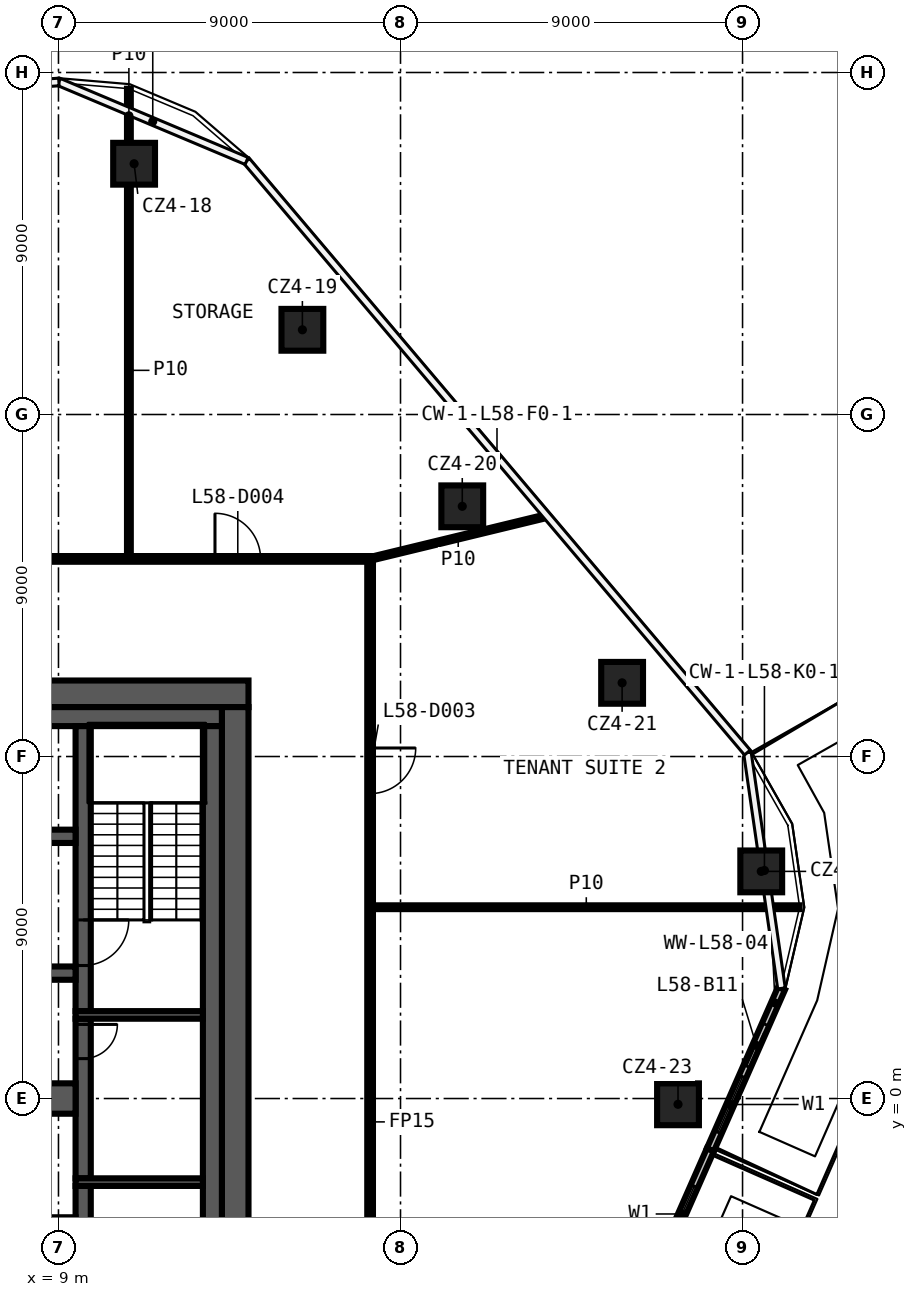
"""IFC4 building model, lengths in metres.
Left out: names, types, materials, properties, quantities, classifications, styles, units other than length and angle.
Written with IfcOpenShell. Run it as: python <this file> out.ifc"""

import sys

from ifc_helpers import new_model, si_unit, direction, frame, frame_2d, origin, origin_2d, place, context, subcontext, project, spatial, rectangle, extrude, element, fill, save


model = new_model("IFC4")
c1 = context("Model", 3, precision=1e-05, world=origin(), true_north=direction((0.0, 1.0)))
c2 = subcontext(c1, "Body", "Model", "MODEL_VIEW")
j1 = project(units=[si_unit("LENGTHUNIT", "METRE"), si_unit("PLANEANGLEUNIT", "RADIAN")], contexts=[c1])
p1 = place(None, origin())
s1 = spatial("IfcSite", under=j1, at=p1, CompositionType="ELEMENT")
p2 = place(p1, origin())
s2 = spatial("IfcBuilding", under=s1, at=p2, CompositionType="ELEMENT")
p3 = place(p2, frame((0.0, 0.0, 274.8)))
s3 = spatial("IfcBuildingStorey", under=s2, at=p3, CompositionType="ELEMENT", Elevation=274.8)
for number, where, z_axis, x_axis in (
    (1, (10.99, 24.599, 0.0), (0.0, 0.0, 1.0), (1.0, 0.0, 0.0)),
    (2, (15.418, 20.229, 0.0), (0.0, 0.0, 1.0), (1.0, 0.0, 0.0)),
    (3, (19.625, 15.584, 0.0), (0.0, 0.0, 1.0), (1.0, 0.0, 0.0)),
    (4, (23.831, 10.939, 0.0), (0.0, 0.0, 1.0), (1.0, 0.0, 0.0)),
    (5, (27.492, 5.977, 0.0), (0.0, 0.0, 1.0), (1.0, 0.0, 0.0)),
    (6, (25.302, -0.152, 0.0), (0.0, 0.0, 1.0), (1.0, 0.0, 0.0)),
):
    element("IfcColumn", number, at=place(p3, frame(where, z_axis=z_axis, x_axis=x_axis)), inside=s3, PredefinedType="COLUMN", context=c2, shape_type="SweptSolid", body=[
        extrude(rectangle(XDim=1.1, YDim=1.1, at=origin_2d()), origin(), (0.0, 0.0, 1.0), 3.82),
    ])
p4 = place(p3, frame((17.275, 5.034, 0.0), z_axis=(0.0, 0.0, 1.0), x_axis=(1.0, 0.0, 0.0)))
e7 = element("IfcWall", 7, at=p4, inside=s3, PredefinedType="PARTITIONING", context=c2, shape_type="SweptSolid", body=[
    extrude(rectangle(XDim=11.227, YDim=0.1, at=frame_2d((5.614, 0.0))), origin(), (0.0, 0.0, 1.0), 3.82),
])
p5 = place(p3, frame((-5.075, 14.2, 0.0), z_axis=(0.0, 0.0, 1.0), x_axis=(1.0, 0.0, 0.0)))
e8 = element("IfcWall", 8, at=p5, inside=s3, PredefinedType="PARTITIONING", context=c2, shape_type="SweptSolid", body=[
    extrude(rectangle(XDim=22.35, YDim=0.15, at=frame_2d((11.175, 0.0))), origin(), (0.0, 0.0, 1.0), 3.82),
])
p6 = place(p5, frame((18.193, 0.0, 0.0)))
e9 = element("IfcOpeningElement", 9, at=p6, cuts=e8, PredefinedType="OPENING", context=c2, shape_type="SweptSolid", body=[
    extrude(rectangle(XDim=1.2, YDim=2.1, at=frame_2d((0.6, 1.05))), frame((0.0, 0.085, 0.0), z_axis=(0.0, -1.0, 0.0), x_axis=(1.0, 0.0, 0.0)), (0.0, 0.0, 1.0), 0.17),
])
p7 = place(p5, frame((11.887, 0.0, 0.0)))
e10 = element("IfcOpeningElement", 10, at=p7, cuts=e8, PredefinedType="OPENING", context=c2, shape_type="SweptSolid", body=[
    extrude(rectangle(XDim=1.2, YDim=2.1, at=frame_2d((0.6, 1.05))), frame((0.0, 0.085, 0.0), z_axis=(0.0, -1.0, 0.0), x_axis=(1.0, 0.0, 0.0)), (0.0, 0.0, 1.0), 0.17),
])
p8 = place(p3, frame((17.2, 14.2, 0.0), z_axis=(0.0, 0.0, 1.0), x_axis=(0.971845844502, 0.235617602322, 0.0)))
e11 = element("IfcWall", 11, at=p8, inside=s3, PredefinedType="PARTITIONING", context=c2, shape_type="SweptSolid", body=[
    extrude(rectangle(XDim=4.771, YDim=0.1, at=frame_2d((2.385, 0.0))), origin(), (0.0, 0.0, 1.0), 3.82),
])
p9 = place(p3, frame((17.2, 14.125, 0.0), z_axis=(0.0, 0.0, 1.0), x_axis=(0.0, -1.0, 0.0)))
e12 = element("IfcWall", 12, at=p9, inside=s3, PredefinedType="PARTITIONING", context=c2, shape_type="SweptSolid", body=[
    extrude(rectangle(XDim=28.25, YDim=0.15, at=frame_2d((14.125, 0.0))), origin(), (0.0, 0.0, 1.0), 3.82),
])
p10 = place(p9, frame((23.379, 0.0, 0.0)))
e13 = element("IfcOpeningElement", 13, at=p10, cuts=e12, PredefinedType="OPENING", context=c2, shape_type="SweptSolid", body=[
    extrude(rectangle(XDim=1.2, YDim=2.1, at=frame_2d((0.6, 1.05))), frame((0.0, 0.085, 0.0), z_axis=(0.0, -1.0, 0.0), x_axis=(1.0, 0.0, 0.0)), (0.0, 0.0, 1.0), 0.17),
])
p11 = place(p9, frame((4.901, 0.0, 0.0)))
e14 = element("IfcOpeningElement", 14, at=p11, cuts=e12, PredefinedType="OPENING", context=c2, shape_type="SweptSolid", body=[
    extrude(rectangle(XDim=1.2, YDim=2.1, at=frame_2d((0.6, 1.05))), frame((0.0, 0.085, 0.0), z_axis=(0.0, -1.0, 0.0), x_axis=(1.0, 0.0, 0.0)), (0.0, 0.0, 1.0), 0.17),
])
p12 = place(p3, frame((10.853, 14.275, 0.0), z_axis=(0.0, 0.0, 1.0), x_axis=(0.0, 1.0, 0.0)))
e15 = element("IfcWall", 15, at=p12, inside=s3, PredefinedType="PARTITIONING", context=c2, shape_type="SweptSolid", body=[
    extrude(rectangle(XDim=9.774, YDim=0.1, at=frame_2d((4.887, 0.0))), origin(), (0.0, 0.0, 1.0), 3.82),
])
p13 = place(p3, frame((10.853, 25.149, 0.0), z_axis=(0.0, 0.0, 1.0), x_axis=(0.0, 1.0, 0.0)))
e16 = element("IfcWall", 16, at=p13, inside=s3, PredefinedType="PARTITIONING", context=c2, shape_type="SweptSolid", body=[
    extrude(rectangle(XDim=1.423, YDim=0.1, at=frame_2d((0.712, 0.0))), origin(), (0.0, 0.0, 1.0), 3.82),
])
p14 = place(p3, frame((20.531, -14.107, 0.0), z_axis=(0.0, 0.0, 1.0), x_axis=(0.40328714446, 0.915073482904, 0.0)))
e17 = element("IfcWall", 17, at=p14, inside=s3, PredefinedType="SOLIDWALL", context=c2, shape_type="SweptSolid", body=[
    extrude(rectangle(XDim=13.944, YDim=0.2, at=frame_2d((6.972, 0.0))), origin(), (0.0, 0.0, 1.0), 3.82),
])
p15 = place(p14, frame((0.5, 0.0, 0.6)))
e18 = element("IfcOpeningElement", 18, at=p15, cuts=e17, PredefinedType="OPENING", context=c2, shape_type="SweptSolid", body=[
    extrude(rectangle(XDim=1.6, YDim=2.4, at=frame_2d((0.8, 1.2))), frame((0.0, 0.11, 0.0), z_axis=(0.0, -1.0, 0.0), x_axis=(1.0, 0.0, 0.0)), (0.0, 0.0, 1.0), 0.22),
])
p16 = place(p14, frame((2.4, 0.0, 0.0)))
e19 = element("IfcOpeningElement", 19, at=p16, cuts=e17, PredefinedType="OPENING", context=c2, shape_type="SweptSolid", body=[
    extrude(rectangle(XDim=1.2, YDim=2.4, at=frame_2d((0.6, 1.2))), frame((0.0, 0.11, 0.0), z_axis=(0.0, -1.0, 0.0), x_axis=(1.0, 0.0, 0.0)), (0.0, 0.0, 1.0), 0.22),
])
p17 = place(p14, frame((6.648, 0.0, 0.6)))
e20 = element("IfcOpeningElement", 20, at=p17, cuts=e17, PredefinedType="OPENING", context=c2, shape_type="SweptSolid", body=[
    extrude(rectangle(XDim=1.6, YDim=2.4, at=frame_2d((0.8, 1.2))), frame((0.0, 0.11, 0.0), z_axis=(0.0, -1.0, 0.0), x_axis=(1.0, 0.0, 0.0)), (0.0, 0.0, 1.0), 0.22),
])
p18 = place(p14, frame((5.148, 0.0, 0.0)))
e21 = element("IfcOpeningElement", 21, at=p18, cuts=e17, PredefinedType="OPENING", context=c2, shape_type="SweptSolid", body=[
    extrude(rectangle(XDim=1.2, YDim=2.4, at=frame_2d((0.6, 1.2))), frame((0.0, 0.11, 0.0), z_axis=(0.0, -1.0, 0.0), x_axis=(1.0, 0.0, 0.0)), (0.0, 0.0, 1.0), 0.22),
])
p19 = place(p14, frame((11.296, 0.0, 0.6)))
e22 = element("IfcOpeningElement", 22, at=p19, cuts=e17, PredefinedType="OPENING", context=c2, shape_type="SweptSolid", body=[
    extrude(rectangle(XDim=1.6, YDim=2.4, at=frame_2d((0.8, 1.2))), frame((0.0, 0.11, 0.0), z_axis=(0.0, -1.0, 0.0), x_axis=(1.0, 0.0, 0.0)), (0.0, 0.0, 1.0), 0.22),
])
p20 = place(p14, frame((9.796, 0.0, 0.0)))
e23 = element("IfcOpeningElement", 23, at=p20, cuts=e17, PredefinedType="OPENING", context=c2, shape_type="SweptSolid", body=[
    extrude(rectangle(XDim=1.2, YDim=2.4, at=frame_2d((0.6, 1.2))), frame((0.0, 0.11, 0.0), z_axis=(0.0, -1.0, 0.0), x_axis=(1.0, 0.0, 0.0)), (0.0, 0.0, 1.0), 0.22),
])
p21 = place(p3, frame((26.154, -1.347, 0.0), z_axis=(0.0, 0.0, 1.0), x_axis=(0.403299401998, 0.915068080718, 0.0)))
e24 = element("IfcWall", 24, at=p21, inside=s3, PredefinedType="SOLIDWALL", context=c2, shape_type="SweptSolid", body=[
    extrude(rectangle(XDim=4.639, YDim=0.2, at=frame_2d((2.319, 0.0))), origin(), (0.0, 0.0, 1.0), 3.82),
])
p22 = place(p21, frame((0.5, 0.0, 0.6)))
e25 = element("IfcOpeningElement", 25, at=p22, cuts=e24, PredefinedType="OPENING", context=c2, shape_type="SweptSolid", body=[
    extrude(rectangle(XDim=1.6, YDim=2.4, at=frame_2d((0.8, 1.2))), frame((0.0, 0.11, 0.0), z_axis=(0.0, -1.0, 0.0), x_axis=(1.0, 0.0, 0.0)), (0.0, 0.0, 1.0), 0.22),
])
p23 = place(p21, frame((2.4, 0.0, 0.0)))
e26 = element("IfcOpeningElement", 26, at=p23, cuts=e24, PredefinedType="OPENING", context=c2, shape_type="SweptSolid", body=[
    extrude(rectangle(XDim=1.2, YDim=2.4, at=frame_2d((0.6, 1.2))), frame((0.0, 0.11, 0.0), z_axis=(0.0, -1.0, 0.0), x_axis=(1.0, 0.0, 0.0)), (0.0, 0.0, 1.0), 0.22),
])
p24 = place(p3, frame((-14.0, 10.65, 0.0), z_axis=(0.0, 0.0, 1.0), x_axis=(1.0, 0.0, 0.0)))
e27 = element("IfcWall", 27, at=p24, inside=s3, PredefinedType="SHEAR", context=c2, shape_type="SweptSolid", body=[
    extrude(rectangle(XDim=28.0, YDim=0.7, at=frame_2d((14.0, 0.0))), origin(), (0.0, 0.0, 1.0), 3.82),
])
p25 = place(p24, frame((15.9, 0.0, 0.0)))
e28 = element("IfcOpeningElement", 28, at=p25, cuts=e27, PredefinedType="OPENING", context=c2, shape_type="SweptSolid", body=[
    extrude(rectangle(XDim=1.6, YDim=2.1, at=frame_2d((0.8, 1.05))), frame((0.0, 0.36, 0.0), z_axis=(0.0, -1.0, 0.0), x_axis=(1.0, 0.0, 0.0)), (0.0, 0.0, 1.0), 0.72),
])
p26 = place(p3, frame((13.65, 10.3, 0.0), z_axis=(0.0, 0.0, 1.0), x_axis=(0.0, -1.0, 0.0)))
e29 = element("IfcWall", 29, at=p26, inside=s3, PredefinedType="SHEAR", context=c2, shape_type="SweptSolid", body=[
    extrude(rectangle(XDim=20.6, YDim=0.7, at=frame_2d((10.3, 0.0))), origin(), (0.0, 0.0, 1.0), 3.82),
])
p27 = place(p3, frame((3.9, 10.05, 0.0), z_axis=(0.0, 0.0, 1.0), x_axis=(1.0, 0.0, 0.0)))
e30 = element("IfcWall", 30, at=p27, inside=s3, PredefinedType="SHEAR", context=c2, shape_type="SweptSolid", body=[
    extrude(rectangle(XDim=9.4, YDim=0.5, at=frame_2d((4.7, 0.0))), origin(), (0.0, 0.0, 1.0), 3.82),
])
p28 = place(p3, frame((13.05, 9.8, 0.0), z_axis=(0.0, 0.0, 1.0), x_axis=(0.0, -1.0, 0.0)))
e31 = element("IfcWall", 31, at=p28, inside=s3, PredefinedType="SHEAR", context=c2, shape_type="SweptSolid", body=[
    extrude(rectangle(XDim=19.6, YDim=0.5, at=frame_2d((9.8, 0.0))), origin(), (0.0, 0.0, 1.0), 3.82),
])
p29 = place(p3, frame((9.65, -2.3, 0.0), z_axis=(0.0, 0.0, 1.0), x_axis=(0.0, -1.0, 0.0)))
e32 = element("IfcWall", 32, at=p29, inside=s3, PredefinedType="SHEAR", context=c2, shape_type="SweptSolid", body=[
    extrude(rectangle(XDim=7.5, YDim=0.4, at=frame_2d((3.75, 0.0))), origin(), (0.0, 0.0, 1.0), 3.82),
])
p30 = place(p29, frame((1.2, 0.0, 0.0)))
e33 = element("IfcOpeningElement", 33, at=p30, cuts=e32, PredefinedType="OPENING", context=c2, shape_type="SweptSolid", body=[
    extrude(rectangle(XDim=1.2, YDim=2.1, at=frame_2d((0.6, 1.05))), frame((0.0, 0.21, 0.0), z_axis=(0.0, -1.0, 0.0), x_axis=(1.0, 0.0, 0.0)), (0.0, 0.0, 1.0), 0.42),
])
p31 = place(p3, frame((9.65, 2.1, 0.0), z_axis=(0.0, 0.0, 1.0), x_axis=(0.0, -1.0, 0.0)))
e34 = element("IfcWall", 34, at=p31, inside=s3, PredefinedType="SHEAR", context=c2, shape_type="SweptSolid", body=[
    extrude(rectangle(XDim=4.2, YDim=0.4, at=frame_2d((2.1, 0.0))), origin(), (0.0, 0.0, 1.0), 3.82),
])
p32 = place(p31, frame((0.15, 0.0, 0.0)))
e35 = element("IfcOpeningElement", 35, at=p32, cuts=e34, PredefinedType="OPENING", context=c2, shape_type="SweptSolid", body=[
    extrude(rectangle(XDim=0.9, YDim=2.1, at=frame_2d((0.45, 1.05))), frame((0.0, 0.21, 0.0), z_axis=(0.0, -1.0, 0.0), x_axis=(1.0, 0.0, 0.0)), (0.0, 0.0, 1.0), 0.42),
])
p33 = place(p3, frame((9.65, 9.8, 0.0), z_axis=(0.0, 0.0, 1.0), x_axis=(0.0, -1.0, 0.0)))
e36 = element("IfcWall", 36, at=p33, inside=s3, PredefinedType="SHEAR", context=c2, shape_type="SweptSolid", body=[
    extrude(rectangle(XDim=7.5, YDim=0.4, at=frame_2d((3.75, 0.0))), origin(), (0.0, 0.0, 1.0), 3.82),
])
p34 = place(p33, frame((5.1, 0.0, 0.0)))
e37 = element("IfcOpeningElement", 37, at=p34, cuts=e36, PredefinedType="OPENING", context=c2, shape_type="SweptSolid", body=[
    extrude(rectangle(XDim=1.2, YDim=2.1, at=frame_2d((0.6, 1.05))), frame((0.0, 0.21, 0.0), z_axis=(0.0, -1.0, 0.0), x_axis=(1.0, 0.0, 0.0)), (0.0, 0.0, 1.0), 0.42),
])
for number, where, z_axis, x_axis in (
    (38, (9.45, 2.2, 0.0), (0.0, 0.0, 1.0), (1.0, 0.0, 0.0)),
    (39, (9.45, -2.2, 0.0), (0.0, 0.0, 1.0), (1.0, 0.0, 0.0)),
):
    element("IfcWall", number, at=place(p3, frame(where, z_axis=z_axis, x_axis=x_axis)), inside=s3, PredefinedType="SHEAR", context=c2, shape_type="SweptSolid", body=[
        extrude(rectangle(XDim=3.35, YDim=0.2, at=frame_2d((1.675, 0.0))), origin(), (0.0, 0.0, 1.0), 3.82),
    ])
p35 = place(p3, frame((-9.45, 6.9, 0.0), z_axis=(0.0, 0.0, 1.0), x_axis=(1.0, 0.0, 0.0)))
e40 = element("IfcWall", 40, at=p35, inside=s3, PredefinedType="SHEAR", context=c2, shape_type="SweptSolid", body=[
    extrude(rectangle(XDim=18.9, YDim=0.35, at=frame_2d((9.45, 0.0))), origin(), (0.0, 0.0, 1.0), 3.82),
])
p36 = place(p35, frame((11.55, 0.0, 0.0)))
e41 = element("IfcOpeningElement", 41, at=p36, cuts=e40, PredefinedType="OPENING", context=c2, shape_type="SweptSolid", body=[
    extrude(rectangle(XDim=1.2, YDim=2.1, at=frame_2d((0.6, 1.05))), frame((0.0, 0.185, 0.0), z_axis=(0.0, -1.0, 0.0), x_axis=(1.0, 0.0, 0.0)), (0.0, 0.0, 1.0), 0.37),
])
p37 = place(p35, frame((14.3, 0.0, 0.0)))
e42 = element("IfcOpeningElement", 42, at=p37, cuts=e40, PredefinedType="OPENING", context=c2, shape_type="SweptSolid", body=[
    extrude(rectangle(XDim=1.1, YDim=2.1, at=frame_2d((0.55, 1.05))), frame((0.0, 0.185, 0.0), z_axis=(0.0, -1.0, 0.0), x_axis=(1.0, 0.0, 0.0)), (0.0, 0.0, 1.0), 0.37),
])
p38 = place(p35, frame((17.0, 0.0, 0.0)))
e43 = element("IfcOpeningElement", 43, at=p38, cuts=e40, PredefinedType="OPENING", context=c2, shape_type="SweptSolid", body=[
    extrude(rectangle(XDim=1.1, YDim=2.1, at=frame_2d((0.55, 1.05))), frame((0.0, 0.185, 0.0), z_axis=(0.0, -1.0, 0.0), x_axis=(1.0, 0.0, 0.0)), (0.0, 0.0, 1.0), 0.37),
])
p39 = place(p35, frame((2.25, 0.0, 0.0)))
e44 = element("IfcOpeningElement", 44, at=p39, cuts=e40, PredefinedType="OPENING", context=c2, shape_type="SweptSolid", body=[
    extrude(rectangle(XDim=0.9, YDim=2.1, at=frame_2d((0.45, 1.05))), frame((0.0, 0.185, 0.0), z_axis=(0.0, -1.0, 0.0), x_axis=(1.0, 0.0, 0.0)), (0.0, 0.0, 1.0), 0.37),
])
p40 = place(p35, frame((7.65, 0.0, 0.0)))
e45 = element("IfcOpeningElement", 45, at=p40, cuts=e40, PredefinedType="OPENING", context=c2, shape_type="SweptSolid", body=[
    extrude(rectangle(XDim=0.9, YDim=2.1, at=frame_2d((0.45, 1.05))), frame((0.0, 0.185, 0.0), z_axis=(0.0, -1.0, 0.0), x_axis=(1.0, 0.0, 0.0)), (0.0, 0.0, 1.0), 0.37),
])
p41 = place(p3, frame((9.45, 3.3, 0.0), z_axis=(0.0, 0.0, 1.0), x_axis=(-1.0, 0.0, 0.0)))
e46 = element("IfcWall", 46, at=p41, inside=s3, PredefinedType="SHEAR", context=c2, shape_type="SweptSolid", body=[
    extrude(rectangle(XDim=18.9, YDim=0.35, at=frame_2d((9.45, 0.0))), origin(), (0.0, 0.0, 1.0), 3.82),
])
p42 = place(p41, frame((6.2, 0.0, 0.0)))
e47 = element("IfcOpeningElement", 47, at=p42, cuts=e46, PredefinedType="OPENING", context=c2, shape_type="SweptSolid", body=[
    extrude(rectangle(XDim=1.1, YDim=2.1, at=frame_2d((0.55, 1.05))), frame((0.0, 0.185, 0.0), z_axis=(0.0, -1.0, 0.0), x_axis=(1.0, 0.0, 0.0)), (0.0, 0.0, 1.0), 0.37),
])
p43 = place(p41, frame((3.5, 0.0, 0.0)))
e48 = element("IfcOpeningElement", 48, at=p43, cuts=e46, PredefinedType="OPENING", context=c2, shape_type="SweptSolid", body=[
    extrude(rectangle(XDim=1.1, YDim=2.1, at=frame_2d((0.55, 1.05))), frame((0.0, 0.185, 0.0), z_axis=(0.0, -1.0, 0.0), x_axis=(1.0, 0.0, 0.0)), (0.0, 0.0, 1.0), 0.37),
])
p44 = place(p41, frame((0.9, 0.0, 0.0)))
e49 = element("IfcOpeningElement", 49, at=p44, cuts=e46, PredefinedType="OPENING", context=c2, shape_type="SweptSolid", body=[
    extrude(rectangle(XDim=0.9, YDim=2.1, at=frame_2d((0.45, 1.05))), frame((0.0, 0.185, 0.0), z_axis=(0.0, -1.0, 0.0), x_axis=(1.0, 0.0, 0.0)), (0.0, 0.0, 1.0), 0.37),
])
p45 = place(p41, frame((17.1, 0.0, 0.0)))
e50 = element("IfcOpeningElement", 50, at=p45, cuts=e46, PredefinedType="OPENING", context=c2, shape_type="SweptSolid", body=[
    extrude(rectangle(XDim=0.9, YDim=2.1, at=frame_2d((0.45, 1.05))), frame((0.0, 0.185, 0.0), z_axis=(0.0, -1.0, 0.0), x_axis=(1.0, 0.0, 0.0)), (0.0, 0.0, 1.0), 0.37),
])
p46 = place(p41, frame((14.4, 0.0, 0.0)))
e51 = element("IfcOpeningElement", 51, at=p46, cuts=e46, PredefinedType="OPENING", context=c2, shape_type="SweptSolid", body=[
    extrude(rectangle(XDim=0.9, YDim=2.1, at=frame_2d((0.45, 1.05))), frame((0.0, 0.185, 0.0), z_axis=(0.0, -1.0, 0.0), x_axis=(1.0, 0.0, 0.0)), (0.0, 0.0, 1.0), 0.37),
])
p47 = place(p41, frame((11.7, 0.0, 0.0)))
e52 = element("IfcOpeningElement", 52, at=p47, cuts=e46, PredefinedType="OPENING", context=c2, shape_type="SweptSolid", body=[
    extrude(rectangle(XDim=0.9, YDim=2.1, at=frame_2d((0.45, 1.05))), frame((0.0, 0.185, 0.0), z_axis=(0.0, -1.0, 0.0), x_axis=(1.0, 0.0, 0.0)), (0.0, 0.0, 1.0), 0.37),
])
p48 = place(p41, frame((9.0, 0.0, 0.0)))
e53 = element("IfcOpeningElement", 53, at=p48, cuts=e46, PredefinedType="OPENING", context=c2, shape_type="SweptSolid", body=[
    extrude(rectangle(XDim=0.9, YDim=2.1, at=frame_2d((0.45, 1.05))), frame((0.0, 0.185, 0.0), z_axis=(0.0, -1.0, 0.0), x_axis=(1.0, 0.0, 0.0)), (0.0, 0.0, 1.0), 0.37),
])
p49 = place(p3, frame((-9.45, 0.0, 0.0), z_axis=(0.0, 0.0, 1.0), x_axis=(1.0, 0.0, 0.0)))
e54 = element("IfcWall", 54, at=p49, inside=s3, PredefinedType="SHEAR", context=c2, shape_type="SweptSolid", body=[
    extrude(rectangle(XDim=18.9, YDim=0.8, at=frame_2d((9.45, 0.0))), origin(), (0.0, 0.0, 1.0), 3.82),
])
p50 = place(p11, origin())
e55 = element("IfcDoor", 55, at=p50, inside=s3, OperationType="SINGLE_SWING_RIGHT", PredefinedType="DOOR", context=c2, shape_type="SweptSolid", body=[
    extrude(rectangle(XDim=1.2, YDim=2.1, at=frame_2d((0.6, 1.05))), frame((0.0, 0.025, 0.0), z_axis=(0.0, -1.0, 0.0), x_axis=(1.0, 0.0, 0.0)), (0.0, 0.0, 1.0), 0.05),
])
fill(e14, e55)
p51 = place(p6, origin())
e56 = element("IfcDoor", 56, at=p51, inside=s3, OperationType="SINGLE_SWING_LEFT", PredefinedType="DOOR", context=c2, shape_type="SweptSolid", body=[
    extrude(rectangle(XDim=1.2, YDim=2.1, at=frame_2d((0.6, 1.05))), frame((0.0, 0.025, 0.0), z_axis=(0.0, -1.0, 0.0), x_axis=(1.0, 0.0, 0.0)), (0.0, 0.0, 1.0), 0.05),
])
fill(e9, e56)
p52 = place(p19, origin())
e57 = element("IfcWindow", 57, at=p52, inside=s3, PartitioningType="SINGLE_PANEL", PredefinedType="WINDOW", context=c2, shape_type="SweptSolid", body=[
    extrude(rectangle(XDim=1.6, YDim=2.4, at=frame_2d((0.8, 1.2))), frame((0.0, 0.03, 0.0), z_axis=(0.0, -1.0, 0.0), x_axis=(1.0, 0.0, 0.0)), (0.0, 0.0, 1.0), 0.06),
])
fill(e22, e57)
p53 = place(p22, origin())
e58 = element("IfcWindow", 58, at=p53, inside=s3, PartitioningType="SINGLE_PANEL", PredefinedType="WINDOW", context=c2, shape_type="SweptSolid", body=[
    extrude(rectangle(XDim=1.6, YDim=2.4, at=frame_2d((0.8, 1.2))), frame((0.0, 0.03, 0.0), z_axis=(0.0, -1.0, 0.0), x_axis=(1.0, 0.0, 0.0)), (0.0, 0.0, 1.0), 0.06),
])
fill(e25, e58)
p54 = place(p23, origin())
e59 = element("IfcDoor", 59, at=p54, inside=s3, OperationType="SLIDING_TO_LEFT", PredefinedType="DOOR", context=c2, shape_type="SweptSolid", body=[
    extrude(rectangle(XDim=1.2, YDim=2.4, at=frame_2d((0.6, 1.2))), frame((0.0, 0.025, 0.0), z_axis=(0.0, -1.0, 0.0), x_axis=(1.0, 0.0, 0.0)), (0.0, 0.0, 1.0), 0.05),
])
fill(e26, e59)
p55 = place(p32, origin())
e60 = element("IfcDoor", 60, at=p55, inside=s3, OperationType="SINGLE_SWING_RIGHT", PredefinedType="DOOR", context=c2, shape_type="SweptSolid", body=[
    extrude(rectangle(XDim=0.9, YDim=2.1, at=frame_2d((0.45, 1.05))), frame((0.0, 0.025, 0.0), z_axis=(0.0, -1.0, 0.0), x_axis=(1.0, 0.0, 0.0)), (0.0, 0.0, 1.0), 0.05),
])
fill(e35, e60)
p56 = place(p34, origin())
e61 = element("IfcDoor", 61, at=p56, inside=s3, OperationType="SINGLE_SWING_LEFT", PredefinedType="DOOR", context=c2, shape_type="SweptSolid", body=[
    extrude(rectangle(XDim=1.2, YDim=2.1, at=frame_2d((0.6, 1.05))), frame((0.0, 0.025, 0.0), z_axis=(0.0, -1.0, 0.0), x_axis=(1.0, 0.0, 0.0)), (0.0, 0.0, 1.0), 0.05),
])
fill(e37, e61)
save(model, sys.argv[1])
